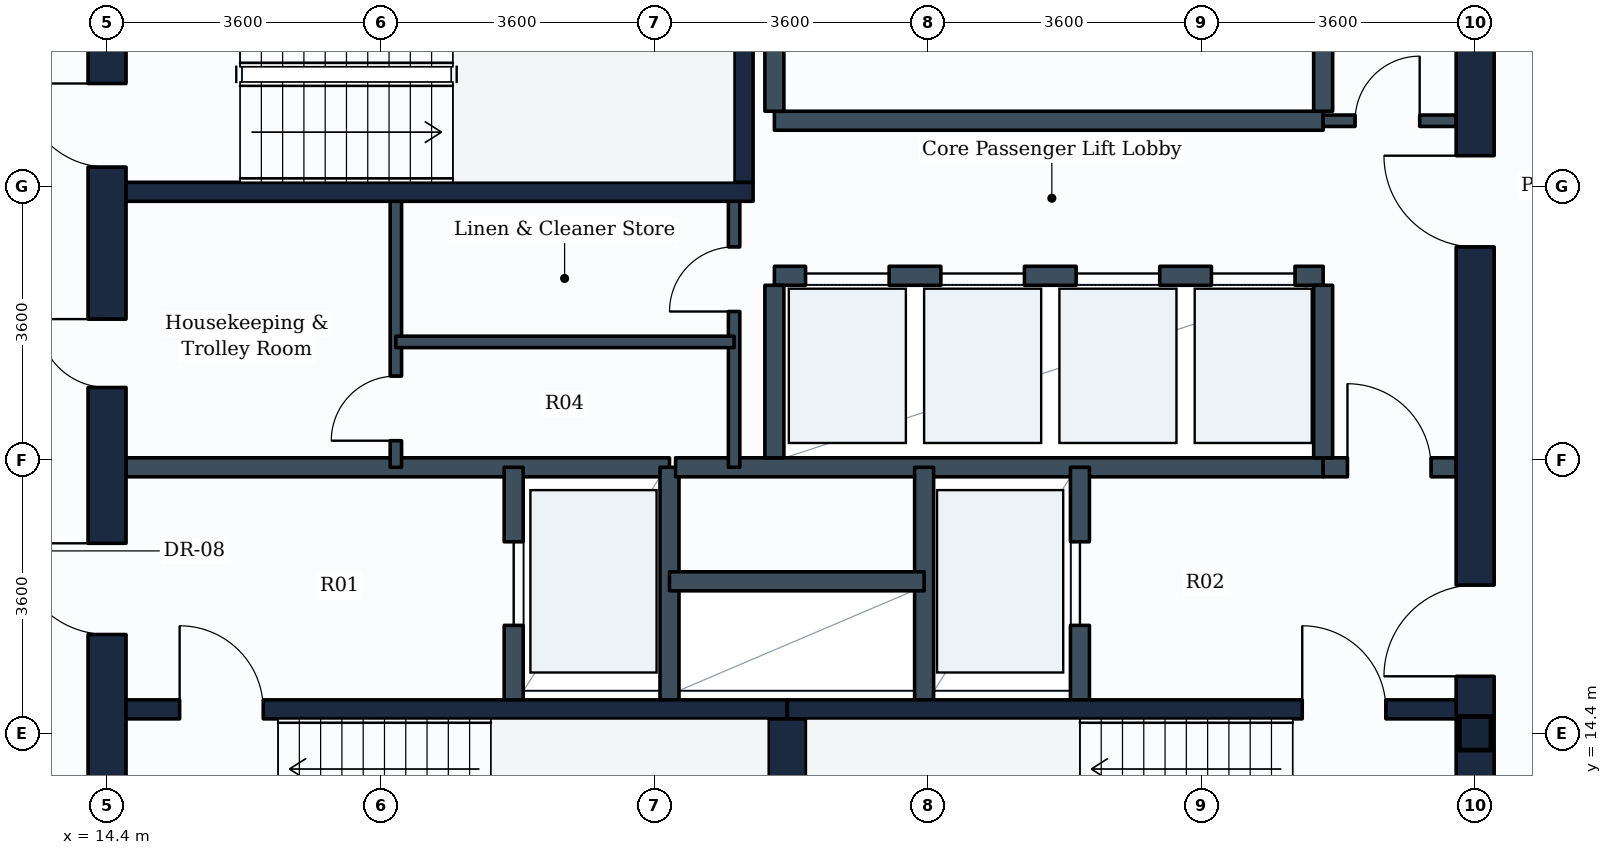
"""IFC4 building model, lengths in metres.
Left out: names, types, materials, properties, quantities, classifications, styles, units other than length and angle.
Written with IfcOpenShell. Run it as: python <this file> out.ifc"""

import sys

from ifc_helpers import new_model, si_unit, direction, frame, frame_2d, origin, origin_2d, place, context, subcontext, project, spatial, rectangle, i_section, extrude, element, fill, save


model = new_model("IFC4")
c1 = context("Model", 3, precision=1e-05, world=origin(), true_north=direction((0.0, 1.0)))
c2 = subcontext(c1, "Body", "Model", "MODEL_VIEW")
j1 = project(units=[si_unit("LENGTHUNIT", "METRE"), si_unit("PLANEANGLEUNIT", "RADIAN")], contexts=[c1])
p1 = place(None, origin())
s1 = spatial("IfcSite", under=j1, at=p1, CompositionType="ELEMENT")
p2 = place(p1, origin())
s2 = spatial("IfcBuilding", under=s1, at=p2, CompositionType="ELEMENT")
p3 = place(p2, frame((0.0, 0.0, 158.0)))
s3 = spatial("IfcBuildingStorey", under=s2, at=p3, CompositionType="ELEMENT", Elevation=158.0)
p4 = place(p3, frame((32.4, 14.4, 0.0), z_axis=(0.0, 0.0, 1.0), x_axis=(1.0, 0.0, 0.0)))
e1 = element("IfcColumn", 1, at=p4, inside=s3, PredefinedType="COLUMN", context=c2, shape_type="SweptSolid", body=[
    extrude(i_section(OverallWidth=0.416, OverallDepth=0.442, WebThickness=0.025, FlangeThickness=0.041, FilletRadius=0.015, at=origin_2d()), origin(), (0.0, 0.0, 1.0), 3.8),
])
p5 = place(p3, frame((14.4, 10.8, 0.0), z_axis=(0.0, 0.0, 1.0), x_axis=(0.0, 1.0, 0.0)))
e2 = element("IfcWall", 2, at=p5, inside=s3, PredefinedType="SHEAR", context=c2, shape_type="SweptSolid", body=[
    extrude(rectangle(XDim=14.4, YDim=0.5, at=frame_2d((7.2, 0.0))), origin(), (0.0, 0.0, 1.0), 3.55),
])
p6 = place(p5, frame((11.05, 0.0, 0.0)))
e3 = element("IfcOpeningElement", 3, at=p6, cuts=e2, PredefinedType="OPENING", context=c2, shape_type="SweptSolid", body=[
    extrude(rectangle(XDim=1.1, YDim=2.1, at=frame_2d((0.55, 1.05))), frame((0.0, 0.26, 0.0), z_axis=(0.0, -1.0, 0.0), x_axis=(1.0, 0.0, 0.0)), (0.0, 0.0, 1.0), 0.52),
])
p7 = place(p5, frame((4.9, 0.0, 0.0)))
e4 = element("IfcOpeningElement", 4, at=p7, cuts=e2, PredefinedType="OPENING", context=c2, shape_type="SweptSolid", body=[
    extrude(rectangle(XDim=1.2, YDim=2.1, at=frame_2d((0.6, 1.05))), frame((0.0, 0.26, 0.0), z_axis=(0.0, -1.0, 0.0), x_axis=(1.0, 0.0, 0.0)), (0.0, 0.0, 1.0), 0.52),
])
p8 = place(p5, frame((8.15, 0.0, 0.0)))
e5 = element("IfcOpeningElement", 5, at=p8, cuts=e2, PredefinedType="OPENING", context=c2, shape_type="SweptSolid", body=[
    extrude(rectangle(XDim=0.9, YDim=2.1, at=frame_2d((0.45, 1.05))), frame((0.0, 0.26, 0.0), z_axis=(0.0, -1.0, 0.0), x_axis=(1.0, 0.0, 0.0)), (0.0, 0.0, 1.0), 0.52),
])
p9 = place(p3, frame((32.4, 10.8, 0.0), z_axis=(0.0, 0.0, 1.0), x_axis=(0.0, 1.0, 0.0)))
e6 = element("IfcWall", 6, at=p9, inside=s3, PredefinedType="SHEAR", context=c2, shape_type="SweptSolid", body=[
    extrude(rectangle(XDim=14.4, YDim=0.5, at=frame_2d((7.2, 0.0))), origin(), (0.0, 0.0, 1.0), 3.55),
])
p10 = place(p9, frame((4.35, 0.0, 0.0)))
e7 = element("IfcOpeningElement", 7, at=p10, cuts=e6, PredefinedType="OPENING", context=c2, shape_type="SweptSolid", body=[
    extrude(rectangle(XDim=1.2, YDim=2.1, at=frame_2d((0.6, 1.05))), frame((0.0, 0.26, 0.0), z_axis=(0.0, -1.0, 0.0), x_axis=(1.0, 0.0, 0.0)), (0.0, 0.0, 1.0), 0.52),
])
p11 = place(p9, frame((10.0, 0.0, 0.0)))
e8 = element("IfcOpeningElement", 8, at=p11, cuts=e6, PredefinedType="OPENING", context=c2, shape_type="SweptSolid", body=[
    extrude(rectangle(XDim=1.2, YDim=2.1, at=frame_2d((0.6, 1.05))), frame((0.0, 0.26, 0.0), z_axis=(0.0, -1.0, 0.0), x_axis=(1.0, 0.0, 0.0)), (0.0, 0.0, 1.0), 0.52),
])
p12 = place(p3, frame((14.65, 14.715, 0.0), z_axis=(0.0, 0.0, 1.0), x_axis=(1.0, 0.0, 0.0)))
e9 = element("IfcWall", 9, at=p12, inside=s3, PredefinedType="SHEAR", context=c2, shape_type="SweptSolid", body=[
    extrude(rectangle(XDim=8.7, YDim=0.25, at=frame_2d((4.35, 0.0))), origin(), (0.0, 0.0, 1.0), 3.55),
])
p13 = place(p12, frame((0.705, 0.0, 0.0)))
e10 = element("IfcOpeningElement", 10, at=p13, cuts=e9, PredefinedType="OPENING", context=c2, shape_type="SweptSolid", body=[
    extrude(rectangle(XDim=1.1, YDim=2.1, at=frame_2d((0.55, 1.05))), frame((0.0, 0.135, 0.0), z_axis=(0.0, -1.0, 0.0), x_axis=(1.0, 0.0, 0.0)), (0.0, 0.0, 1.0), 0.27),
])
p14 = place(p3, frame((23.35, 14.715, 0.0), z_axis=(0.0, 0.0, 1.0), x_axis=(1.0, 0.0, 0.0)))
e11 = element("IfcWall", 11, at=p14, inside=s3, PredefinedType="SHEAR", context=c2, shape_type="SweptSolid", body=[
    extrude(rectangle(XDim=8.8, YDim=0.25, at=frame_2d((4.4, 0.0))), origin(), (0.0, 0.0, 1.0), 3.55),
])
p15 = place(p14, frame((6.775, 0.0, 0.0)))
e12 = element("IfcOpeningElement", 12, at=p15, cuts=e11, PredefinedType="OPENING", context=c2, shape_type="SweptSolid", body=[
    extrude(rectangle(XDim=1.1, YDim=2.1, at=frame_2d((0.55, 1.05))), frame((0.0, 0.135, 0.0), z_axis=(0.0, -1.0, 0.0), x_axis=(1.0, 0.0, 0.0)), (0.0, 0.0, 1.0), 0.27),
])
p16 = place(p3, frame((23.35, 11.75, 0.0), z_axis=(0.0, 0.0, 1.0), x_axis=(0.0, 1.0, 0.0)))
e13 = element("IfcWall", 13, at=p16, inside=s3, PredefinedType="SHEAR", context=c2, shape_type="SweptSolid", body=[
    extrude(rectangle(XDim=2.84, YDim=0.5, at=frame_2d((1.42, 0.0))), origin(), (0.0, 0.0, 1.0), 3.55),
])
p17 = place(p3, frame((14.65, 21.525, 0.0), z_axis=(0.0, 0.0, 1.0), x_axis=(1.0, 0.0, 0.0)))
e14 = element("IfcWall", 14, at=p17, inside=s3, PredefinedType="SHEAR", context=c2, shape_type="SweptSolid", body=[
    extrude(rectangle(XDim=8.25, YDim=0.25, at=frame_2d((4.125, 0.0))), origin(), (0.0, 0.0, 1.0), 3.55),
])
p18 = place(p3, frame((22.775, 21.65, 0.0), z_axis=(0.0, 0.0, 1.0), x_axis=(0.0, 1.0, 0.0)))
e15 = element("IfcWall", 15, at=p18, inside=s3, PredefinedType="SHEAR", context=c2, shape_type="SweptSolid", body=[
    extrude(rectangle(XDim=2.84, YDim=0.25, at=frame_2d((1.42, 0.0))), origin(), (0.0, 0.0, 1.0), 3.55),
])
p19 = place(p3, frame((14.65, 17.9, 0.0), z_axis=(0.0, 0.0, 1.0), x_axis=(1.0, 0.0, 0.0)))
e16 = element("IfcWall", 16, at=p19, inside=s3, PredefinedType="PARTITIONING", context=c2, shape_type="SweptSolid", body=[
    extrude(rectangle(XDim=7.15, YDim=0.25, at=frame_2d((3.575, 0.0))), origin(), (0.0, 0.0, 1.0), 3.535),
])
p20 = place(p3, frame((19.75, 14.84, 0.0), z_axis=(0.0, 0.0, 1.0), x_axis=(0.0, 1.0, 0.0)))
e17 = element("IfcWall", 17, at=p20, inside=s3, PredefinedType="PARTITIONING", context=c2, shape_type="SweptSolid", body=[
    extrude(rectangle(XDim=3.06, YDim=0.25, at=frame_2d((1.53, 0.0))), origin(), (0.0, 0.0, 1.0), 3.535),
])
p21 = place(p20, frame((0.98, 0.0, 0.0)))
e18 = element("IfcOpeningElement", 18, at=p21, cuts=e17, PredefinedType="OPENING", context=c2, shape_type="SweptSolid", body=[
    extrude(rectangle(XDim=1.1, YDim=2.1, at=frame_2d((0.55, 1.05))), frame((0.0, 0.135, 0.0), z_axis=(0.0, -1.0, 0.0), x_axis=(1.0, 0.0, 0.0)), (0.0, 0.0, 1.0), 0.27),
])
p22 = place(p3, frame((21.8, 14.84, 0.0), z_axis=(0.0, 0.0, 1.0), x_axis=(0.0, 1.0, 0.0)))
e19 = element("IfcWall", 19, at=p22, inside=s3, PredefinedType="PARTITIONING", context=c2, shape_type="SweptSolid", body=[
    extrude(rectangle(XDim=3.06, YDim=0.25, at=frame_2d((1.53, 0.0))), origin(), (0.0, 0.0, 1.0), 3.535),
])
p23 = place(p3, frame((21.88, 17.9, 0.0), z_axis=(0.0, 0.0, 1.0), x_axis=(1.0, 0.0, 0.0)))
e20 = element("IfcWall", 20, at=p23, inside=s3, PredefinedType="PARTITIONING", context=c2, shape_type="SweptSolid", body=[
    extrude(rectangle(XDim=8.52, YDim=0.25, at=frame_2d((4.26, 0.0))), origin(), (0.0, 0.0, 1.0), 3.535),
])
p24 = place(p3, frame((30.4, 17.9, 0.0), z_axis=(0.0, 0.0, 1.0), x_axis=(1.0, 0.0, 0.0)))
e21 = element("IfcWall", 21, at=p24, inside=s3, PredefinedType="PARTITIONING", context=c2, shape_type="SweptSolid", body=[
    extrude(rectangle(XDim=1.75, YDim=0.25, at=frame_2d((0.875, 0.0))), origin(), (0.0, 0.0, 1.0), 3.535),
])
p25 = place(p24, frame((0.32, 0.0, 0.0)))
e22 = element("IfcOpeningElement", 22, at=p25, cuts=e21, PredefinedType="OPENING", context=c2, shape_type="SweptSolid", body=[
    extrude(rectangle(XDim=1.1, YDim=2.1, at=frame_2d((0.55, 1.05))), frame((0.0, 0.135, 0.0), z_axis=(0.0, -1.0, 0.0), x_axis=(1.0, 0.0, 0.0)), (0.0, 0.0, 1.0), 0.27),
])
p26 = place(p3, frame((25.15, 14.84, 0.0), z_axis=(0.0, 0.0, 1.0), x_axis=(0.0, 1.0, 0.0)))
e23 = element("IfcWall", 23, at=p26, inside=s3, PredefinedType="PARTITIONING", context=c2, shape_type="SweptSolid", body=[
    extrude(rectangle(XDim=3.06, YDim=0.25, at=frame_2d((1.53, 0.0))), origin(), (0.0, 0.0, 1.0), 3.535),
])
p27 = place(p3, frame((27.2, 14.84, 0.0), z_axis=(0.0, 0.0, 1.0), x_axis=(0.0, 1.0, 0.0)))
e24 = element("IfcWall", 24, at=p27, inside=s3, PredefinedType="PARTITIONING", context=c2, shape_type="SweptSolid", body=[
    extrude(rectangle(XDim=3.06, YDim=0.25, at=frame_2d((1.53, 0.0))), origin(), (0.0, 0.0, 1.0), 3.535),
])
p28 = place(p27, frame((0.98, 0.0, 0.0)))
e25 = element("IfcOpeningElement", 25, at=p28, cuts=e24, PredefinedType="OPENING", context=c2, shape_type="SweptSolid", body=[
    extrude(rectangle(XDim=1.1, YDim=2.1, at=frame_2d((0.55, 1.05))), frame((0.0, 0.135, 0.0), z_axis=(0.0, -1.0, 0.0), x_axis=(1.0, 0.0, 0.0)), (0.0, 0.0, 1.0), 0.27),
])
p29 = place(p3, frame((21.8, 16.4, 0.0), z_axis=(0.0, 0.0, 1.0), x_axis=(1.0, 0.0, 0.0)))
e26 = element("IfcWall", 26, at=p29, inside=s3, PredefinedType="PARTITIONING", context=c2, shape_type="SweptSolid", body=[
    extrude(rectangle(XDim=3.35, YDim=0.25, at=frame_2d((1.675, 0.0))), origin(), (0.0, 0.0, 1.0), 3.535),
])
p30 = place(p3, frame((23.18, 20.42, 0.0), z_axis=(0.0, 0.0, 1.0), x_axis=(1.0, 0.0, 0.0)))
e27 = element("IfcWall", 27, at=p30, inside=s3, PredefinedType="PARTITIONING", context=c2, shape_type="SweptSolid", body=[
    extrude(rectangle(XDim=7.22, YDim=0.25, at=frame_2d((3.61, 0.0))), origin(), (0.0, 0.0, 1.0), 3.535),
])
p31 = place(p30, frame((0.41, 0.0, 0.0)))
e28 = element("IfcOpeningElement", 28, at=p31, cuts=e27, PredefinedType="OPENING", context=c2, shape_type="SweptSolid", body=[
    extrude(rectangle(XDim=1.1, YDim=2.1, at=frame_2d((0.55, 1.05))), frame((0.0, 0.135, 0.0), z_axis=(0.0, -1.0, 0.0), x_axis=(1.0, 0.0, 0.0)), (0.0, 0.0, 1.0), 0.27),
])
p32 = place(p30, frame((2.19, 0.0, 0.0)))
e29 = element("IfcOpeningElement", 29, at=p32, cuts=e27, PredefinedType="OPENING", context=c2, shape_type="SweptSolid", body=[
    extrude(rectangle(XDim=1.1, YDim=2.1, at=frame_2d((0.55, 1.05))), frame((0.0, 0.135, 0.0), z_axis=(0.0, -1.0, 0.0), x_axis=(1.0, 0.0, 0.0)), (0.0, 0.0, 1.0), 0.27),
])
p33 = place(p30, frame((3.97, 0.0, 0.0)))
e30 = element("IfcOpeningElement", 30, at=p33, cuts=e27, PredefinedType="OPENING", context=c2, shape_type="SweptSolid", body=[
    extrude(rectangle(XDim=1.1, YDim=2.1, at=frame_2d((0.55, 1.05))), frame((0.0, 0.135, 0.0), z_axis=(0.0, -1.0, 0.0), x_axis=(1.0, 0.0, 0.0)), (0.0, 0.0, 1.0), 0.27),
])
p34 = place(p30, frame((5.75, 0.0, 0.0)))
e31 = element("IfcOpeningElement", 31, at=p34, cuts=e27, PredefinedType="OPENING", context=c2, shape_type="SweptSolid", body=[
    extrude(rectangle(XDim=1.1, YDim=2.1, at=frame_2d((0.55, 1.05))), frame((0.0, 0.135, 0.0), z_axis=(0.0, -1.0, 0.0), x_axis=(1.0, 0.0, 0.0)), (0.0, 0.0, 1.0), 0.27),
])
for number, where, z_axis, x_axis in (
    (32, (23.18, 18.025, 0.0), (0.0, 0.0, 1.0), (0.0, 1.0, 0.0)),
    (33, (30.4, 18.025, 0.0), (0.0, 0.0, 1.0), (0.0, 1.0, 0.0)),
):
    element("IfcWall", number, at=place(p3, frame(where, z_axis=z_axis, x_axis=x_axis)), inside=s3, PredefinedType="PARTITIONING", context=c2, shape_type="SweptSolid", body=[
        extrude(rectangle(XDim=2.27, YDim=0.25, at=frame_2d((1.135, 0.0))), origin(), (0.0, 0.0, 1.0), 3.535),
    ])
p35 = place(p3, frame((23.18, 22.46, 0.0), z_axis=(0.0, 0.0, 1.0), x_axis=(1.0, 0.0, 0.0)))
e34 = element("IfcWall", 34, at=p35, inside=s3, PredefinedType="PARTITIONING", context=c2, shape_type="SweptSolid", body=[
    extrude(rectangle(XDim=7.22, YDim=0.25, at=frame_2d((3.61, 0.0))), origin(), (0.0, 0.0, 1.0), 3.535),
])
for number, where, z_axis, x_axis in (
    (35, (23.18, 22.585, 0.0), (0.0, 0.0, 1.0), (0.0, 1.0, 0.0)),
    (36, (30.4, 22.585, 0.0), (0.0, 0.0, 1.0), (0.0, 1.0, 0.0)),
):
    element("IfcWall", number, at=place(p3, frame(where, z_axis=z_axis, x_axis=x_axis)), inside=s3, PredefinedType="PARTITIONING", context=c2, shape_type="SweptSolid", body=[
        extrude(rectangle(XDim=2.315, YDim=0.25, at=frame_2d((1.157, 0.0))), origin(), (0.0, 0.0, 1.0), 3.535),
    ])
p36 = place(p3, frame((22.65, 17.9, 0.0), z_axis=(0.0, 0.0, 1.0), x_axis=(0.0, 1.0, 0.0)))
e37 = element("IfcWall", 37, at=p36, inside=s3, PredefinedType="PARTITIONING", context=c2, shape_type="SweptSolid", body=[
    extrude(rectangle(XDim=3.625, YDim=0.15, at=frame_2d((1.812, 0.0))), origin(), (0.0, 0.0, 1.0), 3.535),
])
p37 = place(p36, frame((2.05, 0.0, 0.0)))
e38 = element("IfcOpeningElement", 38, at=p37, cuts=e37, PredefinedType="OPENING", context=c2, shape_type="SweptSolid", body=[
    extrude(rectangle(XDim=0.85, YDim=2.1, at=frame_2d((0.425, 1.05))), frame((0.0, 0.085, 0.0), z_axis=(0.0, -1.0, 0.0), x_axis=(1.0, 0.0, 0.0)), (0.0, 0.0, 1.0), 0.17),
])
p38 = place(p3, frame((18.2, 17.9, 0.0), z_axis=(0.0, 0.0, 1.0), x_axis=(0.0, 1.0, 0.0)))
e39 = element("IfcWall", 39, at=p38, inside=s3, PredefinedType="PARTITIONING", context=c2, shape_type="SweptSolid", body=[
    extrude(rectangle(XDim=3.625, YDim=0.15, at=frame_2d((1.812, 0.0))), origin(), (0.0, 0.0, 1.0), 3.535),
])
p39 = place(p38, frame((0.35, 0.0, 0.0)))
e40 = element("IfcOpeningElement", 40, at=p39, cuts=e39, PredefinedType="OPENING", context=c2, shape_type="SweptSolid", body=[
    extrude(rectangle(XDim=0.85, YDim=2.1, at=frame_2d((0.425, 1.05))), frame((0.0, 0.085, 0.0), z_axis=(0.0, -1.0, 0.0), x_axis=(1.0, 0.0, 0.0)), (0.0, 0.0, 1.0), 0.17),
])
p40 = place(p3, frame((18.2, 19.55, 0.0), z_axis=(0.0, 0.0, 1.0), x_axis=(1.0, 0.0, 0.0)))
e41 = element("IfcWall", 41, at=p40, inside=s3, PredefinedType="PARTITIONING", context=c2, shape_type="SweptSolid", body=[
    extrude(rectangle(XDim=4.45, YDim=0.15, at=frame_2d((2.225, 0.0))), origin(), (0.0, 0.0, 1.0), 3.535),
])
p41 = place(p3, frame((30.4, 22.46, 0.0), z_axis=(0.0, 0.0, 1.0), x_axis=(1.0, 0.0, 0.0)))
e42 = element("IfcWall", 42, at=p41, inside=s3, PredefinedType="PARTITIONING", context=c2, shape_type="SweptSolid", body=[
    extrude(rectangle(XDim=1.75, YDim=0.15, at=frame_2d((0.875, 0.0))), origin(), (0.0, 0.0, 1.0), 3.535),
])
p42 = place(p41, frame((0.42, 0.0, 0.0)))
e43 = element("IfcOpeningElement", 43, at=p42, cuts=e42, PredefinedType="OPENING", context=c2, shape_type="SweptSolid", body=[
    extrude(rectangle(XDim=0.85, YDim=2.1, at=frame_2d((0.425, 1.05))), frame((0.0, 0.085, 0.0), z_axis=(0.0, -1.0, 0.0), x_axis=(1.0, 0.0, 0.0)), (0.0, 0.0, 1.0), 0.17),
])
p43 = place(p13, origin())
e44 = element("IfcDoor", 44, at=p43, inside=s3, OperationType="SINGLE_SWING_LEFT", PredefinedType="DOOR", context=c2, shape_type="SweptSolid", body=[
    extrude(rectangle(XDim=1.1, YDim=2.1, at=frame_2d((0.55, 1.05))), frame((0.0, 0.025, 0.0), z_axis=(0.0, -1.0, 0.0), x_axis=(1.0, 0.0, 0.0)), (0.0, 0.0, 1.0), 0.05),
])
fill(e10, e44)
p44 = place(p15, origin())
e45 = element("IfcDoor", 45, at=p44, inside=s3, OperationType="SINGLE_SWING_LEFT", PredefinedType="DOOR", context=c2, shape_type="SweptSolid", body=[
    extrude(rectangle(XDim=1.1, YDim=2.1, at=frame_2d((0.55, 1.05))), frame((0.0, 0.025, 0.0), z_axis=(0.0, -1.0, 0.0), x_axis=(1.0, 0.0, 0.0)), (0.0, 0.0, 1.0), 0.05),
])
fill(e12, e45)
p45 = place(p6, origin())
e46 = element("IfcDoor", 46, at=p45, inside=s3, OperationType="SINGLE_SWING_RIGHT", PredefinedType="DOOR", context=c2, shape_type="SweptSolid", body=[
    extrude(rectangle(XDim=1.1, YDim=2.1, at=frame_2d((0.55, 1.05))), frame((0.0, 0.025, 0.0), z_axis=(0.0, -1.0, 0.0), x_axis=(1.0, 0.0, 0.0)), (0.0, 0.0, 1.0), 0.05),
])
fill(e3, e46)
p46 = place(p21, origin())
e47 = element("IfcDoor", 47, at=p46, inside=s3, OperationType="SLIDING_TO_LEFT", PredefinedType="DOOR", context=c2, shape_type="SweptSolid", body=[
    extrude(rectangle(XDim=1.1, YDim=2.1, at=frame_2d((0.55, 1.05))), frame((0.0, 0.025, 0.0), z_axis=(0.0, -1.0, 0.0), x_axis=(1.0, 0.0, 0.0)), (0.0, 0.0, 1.0), 0.05),
])
fill(e18, e47)
p47 = place(p28, origin())
e48 = element("IfcDoor", 48, at=p47, inside=s3, OperationType="SLIDING_TO_LEFT", PredefinedType="DOOR", context=c2, shape_type="SweptSolid", body=[
    extrude(rectangle(XDim=1.1, YDim=2.1, at=frame_2d((0.55, 1.05))), frame((0.0, 0.025, 0.0), z_axis=(0.0, -1.0, 0.0), x_axis=(1.0, 0.0, 0.0)), (0.0, 0.0, 1.0), 0.05),
])
fill(e25, e48)
p48 = place(p7, origin())
e49 = element("IfcDoor", 49, at=p48, inside=s3, OperationType="SINGLE_SWING_RIGHT", PredefinedType="DOOR", context=c2, shape_type="SweptSolid", body=[
    extrude(rectangle(XDim=1.2, YDim=2.1, at=frame_2d((0.6, 1.05))), frame((0.0, 0.025, 0.0), z_axis=(0.0, -1.0, 0.0), x_axis=(1.0, 0.0, 0.0)), (0.0, 0.0, 1.0), 0.05),
])
fill(e4, e49)
p49 = place(p10, origin())
e50 = element("IfcDoor", 50, at=p49, inside=s3, OperationType="SINGLE_SWING_LEFT", PredefinedType="DOOR", context=c2, shape_type="SweptSolid", body=[
    extrude(rectangle(XDim=1.2, YDim=2.1, at=frame_2d((0.6, 1.05))), frame((0.0, 0.025, 0.0), z_axis=(0.0, -1.0, 0.0), x_axis=(1.0, 0.0, 0.0)), (0.0, 0.0, 1.0), 0.05),
])
fill(e7, e50)
p50 = place(p25, origin())
e51 = element("IfcDoor", 51, at=p50, inside=s3, OperationType="SINGLE_SWING_LEFT", PredefinedType="DOOR", context=c2, shape_type="SweptSolid", body=[
    extrude(rectangle(XDim=1.1, YDim=2.1, at=frame_2d((0.55, 1.05))), frame((0.0, 0.025, 0.0), z_axis=(0.0, -1.0, 0.0), x_axis=(1.0, 0.0, 0.0)), (0.0, 0.0, 1.0), 0.05),
])
fill(e22, e51)
p51 = place(p31, origin())
e52 = element("IfcDoor", 52, at=p51, inside=s3, OperationType="SLIDING_TO_LEFT", PredefinedType="DOOR", context=c2, shape_type="SweptSolid", body=[
    extrude(rectangle(XDim=1.1, YDim=2.1, at=frame_2d((0.55, 1.05))), frame((0.0, 0.025, 0.0), z_axis=(0.0, -1.0, 0.0), x_axis=(1.0, 0.0, 0.0)), (0.0, 0.0, 1.0), 0.05),
])
fill(e28, e52)
p52 = place(p32, origin())
e53 = element("IfcDoor", 53, at=p52, inside=s3, OperationType="SLIDING_TO_LEFT", PredefinedType="DOOR", context=c2, shape_type="SweptSolid", body=[
    extrude(rectangle(XDim=1.1, YDim=2.1, at=frame_2d((0.55, 1.05))), frame((0.0, 0.025, 0.0), z_axis=(0.0, -1.0, 0.0), x_axis=(1.0, 0.0, 0.0)), (0.0, 0.0, 1.0), 0.05),
])
fill(e29, e53)
p53 = place(p33, origin())
e54 = element("IfcDoor", 54, at=p53, inside=s3, OperationType="SLIDING_TO_LEFT", PredefinedType="DOOR", context=c2, shape_type="SweptSolid", body=[
    extrude(rectangle(XDim=1.1, YDim=2.1, at=frame_2d((0.55, 1.05))), frame((0.0, 0.025, 0.0), z_axis=(0.0, -1.0, 0.0), x_axis=(1.0, 0.0, 0.0)), (0.0, 0.0, 1.0), 0.05),
])
fill(e30, e54)
p54 = place(p34, origin())
e55 = element("IfcDoor", 55, at=p54, inside=s3, OperationType="SLIDING_TO_LEFT", PredefinedType="DOOR", context=c2, shape_type="SweptSolid", body=[
    extrude(rectangle(XDim=1.1, YDim=2.1, at=frame_2d((0.55, 1.05))), frame((0.0, 0.025, 0.0), z_axis=(0.0, -1.0, 0.0), x_axis=(1.0, 0.0, 0.0)), (0.0, 0.0, 1.0), 0.05),
])
fill(e31, e55)
p55 = place(p11, origin())
e56 = element("IfcDoor", 56, at=p55, inside=s3, OperationType="SINGLE_SWING_RIGHT", PredefinedType="DOOR", context=c2, shape_type="SweptSolid", body=[
    extrude(rectangle(XDim=1.2, YDim=2.1, at=frame_2d((0.6, 1.05))), frame((0.0, 0.025, 0.0), z_axis=(0.0, -1.0, 0.0), x_axis=(1.0, 0.0, 0.0)), (0.0, 0.0, 1.0), 0.05),
])
fill(e8, e56)
p56 = place(p8, origin())
e57 = element("IfcDoor", 57, at=p56, inside=s3, OperationType="SINGLE_SWING_RIGHT", PredefinedType="DOOR", context=c2, shape_type="SweptSolid", body=[
    extrude(rectangle(XDim=0.9, YDim=2.1, at=frame_2d((0.45, 1.05))), frame((0.0, 0.025, 0.0), z_axis=(0.0, -1.0, 0.0), x_axis=(1.0, 0.0, 0.0)), (0.0, 0.0, 1.0), 0.05),
])
fill(e5, e57)
p57 = place(p39, origin())
e58 = element("IfcDoor", 58, at=p57, inside=s3, OperationType="SINGLE_SWING_LEFT", PredefinedType="DOOR", context=c2, shape_type="SweptSolid", body=[
    extrude(rectangle(XDim=0.85, YDim=2.1, at=frame_2d((0.425, 1.05))), frame((0.0, 0.025, 0.0), z_axis=(0.0, -1.0, 0.0), x_axis=(1.0, 0.0, 0.0)), (0.0, 0.0, 1.0), 0.05),
])
fill(e40, e58)
p58 = place(p37, origin())
e59 = element("IfcDoor", 59, at=p58, inside=s3, OperationType="SINGLE_SWING_LEFT", PredefinedType="DOOR", context=c2, shape_type="SweptSolid", body=[
    extrude(rectangle(XDim=0.85, YDim=2.1, at=frame_2d((0.425, 1.05))), frame((0.0, 0.025, 0.0), z_axis=(0.0, -1.0, 0.0), x_axis=(1.0, 0.0, 0.0)), (0.0, 0.0, 1.0), 0.05),
])
fill(e38, e59)
p59 = place(p42, origin())
e60 = element("IfcDoor", 60, at=p59, inside=s3, OperationType="SINGLE_SWING_RIGHT", PredefinedType="DOOR", context=c2, shape_type="SweptSolid", body=[
    extrude(rectangle(XDim=0.85, YDim=2.1, at=frame_2d((0.425, 1.05))), frame((0.0, 0.025, 0.0), z_axis=(0.0, -1.0, 0.0), x_axis=(1.0, 0.0, 0.0)), (0.0, 0.0, 1.0), 0.05),
])
fill(e43, e60)
save(model, sys.argv[1])
